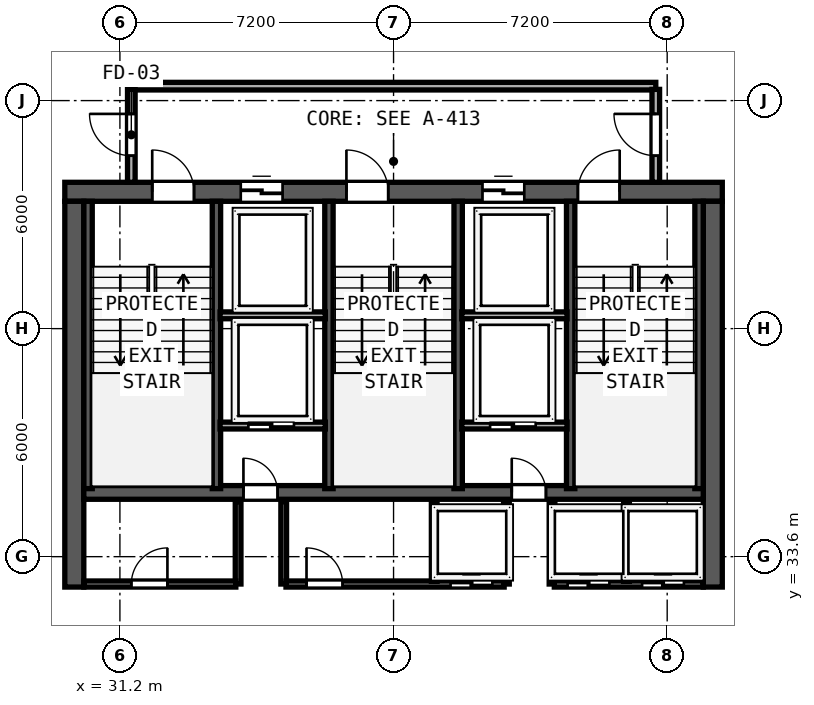
"""IFC4 building model, lengths in metres.
Left out: names, types, materials, properties, quantities, classifications, styles, units other than length and angle.
Written with IfcOpenShell. Run it as: python <this file> out.ifc"""

import sys

from ifc_helpers import new_model, si_unit, direction, frame, frame_2d, origin, place, context, subcontext, project, spatial, rectangle, extrude, element, fill, save


model = new_model("IFC4")
c1 = context("Model", 3, precision=1e-05, world=origin(), true_north=direction((0.0, 1.0)))
c2 = subcontext(c1, "Body", "Model", "MODEL_VIEW")
j1 = project(units=[si_unit("LENGTHUNIT", "METRE"), si_unit("PLANEANGLEUNIT", "RADIAN")], contexts=[c1])
p1 = place(None, origin())
s1 = spatial("IfcSite", under=j1, at=p1, CompositionType="ELEMENT")
p2 = place(p1, origin())
s2 = spatial("IfcBuilding", under=s1, at=p2, CompositionType="ELEMENT")
p3 = place(p2, frame((0.0, 0.0, 246.75)))
s3 = spatial("IfcBuildingStorey", under=s2, at=p3, CompositionType="ELEMENT", Elevation=246.75)
p4 = place(p3, frame((29.75, 43.2, 0.0), z_axis=(0.0, 0.0, 1.0), x_axis=(1.0, 0.0, 0.0)))
e1 = element("IfcWall", 1, at=p4, inside=s3, PredefinedType="SHEAR", context=c2, shape_type="SweptSolid", body=[
    extrude(rectangle(XDim=17.3, YDim=0.5, at=frame_2d((8.65, 0.0))), origin(), (0.0, 0.0, 1.0), 3.67),
])
p5 = place(p4, frame((2.3, 0.0, 0.0)))
e2 = element("IfcOpeningElement", 2, at=p5, cuts=e1, PredefinedType="OPENING", context=c2, shape_type="SweptSolid", body=[
    extrude(rectangle(XDim=1.1, YDim=2.15, at=frame_2d((0.55, 1.075))), frame((0.0, 0.26, 0.0), z_axis=(0.0, -1.0, 0.0), x_axis=(1.0, 0.0, 0.0)), (0.0, 0.0, 1.0), 0.52),
])
p6 = place(p4, frame((7.41, 0.0, 0.0)))
e3 = element("IfcOpeningElement", 3, at=p6, cuts=e1, PredefinedType="OPENING", context=c2, shape_type="SweptSolid", body=[
    extrude(rectangle(XDim=1.1, YDim=2.15, at=frame_2d((0.55, 1.075))), frame((0.0, 0.26, 0.0), z_axis=(0.0, -1.0, 0.0), x_axis=(1.0, 0.0, 0.0)), (0.0, 0.0, 1.0), 0.52),
])
p7 = place(p4, frame((13.5, 0.0, 0.0)))
e4 = element("IfcOpeningElement", 4, at=p7, cuts=e1, PredefinedType="OPENING", context=c2, shape_type="SweptSolid", body=[
    extrude(rectangle(XDim=1.1, YDim=2.15, at=frame_2d((0.55, 1.075))), frame((0.0, 0.26, 0.0), z_axis=(0.0, -1.0, 0.0), x_axis=(1.0, 0.0, 0.0)), (0.0, 0.0, 1.0), 0.52),
])
p8 = place(p4, frame((4.63, 0.0, 0.0)))
e5 = element("IfcOpeningElement", 5, at=p8, cuts=e1, PredefinedType="OPENING", context=c2, shape_type="SweptSolid", body=[
    extrude(rectangle(XDim=1.1, YDim=2.2, at=frame_2d((0.55, 1.1))), frame((0.0, 0.26, 0.0), z_axis=(0.0, -1.0, 0.0), x_axis=(1.0, 0.0, 0.0)), (0.0, 0.0, 1.0), 0.52),
])
p9 = place(p4, frame((10.99, 0.0, 0.0)))
e6 = element("IfcOpeningElement", 6, at=p9, cuts=e1, PredefinedType="OPENING", context=c2, shape_type="SweptSolid", body=[
    extrude(rectangle(XDim=1.1, YDim=2.2, at=frame_2d((0.55, 1.1))), frame((0.0, 0.26, 0.0), z_axis=(0.0, -1.0, 0.0), x_axis=(1.0, 0.0, 0.0)), (0.0, 0.0, 1.0), 0.52),
])
for number, where, z_axis, x_axis in (
    (7, (30.0, 32.8, 0.0), (0.0, 0.0, 1.0), (0.0, 1.0, 0.0)),
    (8, (46.8, 32.8, 0.0), (0.0, 0.0, 1.0), (0.0, 1.0, 0.0)),
):
    element("IfcWall", number, at=place(p3, frame(where, z_axis=z_axis, x_axis=x_axis)), inside=s3, PredefinedType="SHEAR", context=c2, shape_type="SweptSolid", body=[
        extrude(rectangle(XDim=10.15, YDim=0.5, at=frame_2d((5.075, 0.0))), origin(), (0.0, 0.0, 1.0), 3.67),
    ])
p10 = place(p3, frame((30.25, 35.29, 0.0), z_axis=(0.0, 0.0, 1.0), x_axis=(1.0, 0.0, 0.0)))
e9 = element("IfcWall", 9, at=p10, inside=s3, PredefinedType="SHEAR", context=c2, shape_type="SweptSolid", body=[
    extrude(rectangle(XDim=16.3, YDim=0.36, at=frame_2d((8.15, 0.0))), origin(), (0.0, 0.0, 1.0), 3.67),
])
p11 = place(p10, frame((5.1, 0.0, 0.0), z_axis=(0.0, 0.0, 1.0), x_axis=(-1.0, 0.0, 0.0)))
e10 = element("IfcOpeningElement", 10, at=p11, cuts=e9, PredefinedType="OPENING", context=c2, shape_type="SweptSolid", body=[
    extrude(rectangle(XDim=0.9, YDim=2.1, at=frame_2d((0.45, 1.05))), frame((0.0, 0.19, 0.0), z_axis=(0.0, -1.0, 0.0), x_axis=(1.0, 0.0, 0.0)), (0.0, 0.0, 1.0), 0.38),
])
p12 = place(p10, frame((12.16, 0.0, 0.0), z_axis=(0.0, 0.0, 1.0), x_axis=(-1.0, 0.0, 0.0)))
e11 = element("IfcOpeningElement", 11, at=p12, cuts=e9, PredefinedType="OPENING", context=c2, shape_type="SweptSolid", body=[
    extrude(rectangle(XDim=0.9, YDim=2.1, at=frame_2d((0.45, 1.05))), frame((0.0, 0.19, 0.0), z_axis=(0.0, -1.0, 0.0), x_axis=(1.0, 0.0, 0.0)), (0.0, 0.0, 1.0), 0.38),
])
for number, where, z_axis, x_axis in (
    (12, (30.362, 35.39, 0.0), (0.0, 0.0, 1.0), (0.0, 1.0, 0.0)),
    (13, (33.74, 35.39, 0.0), (0.0, 0.0, 1.0), (0.0, 1.0, 0.0)),
    (14, (36.7, 35.39, 0.0), (0.0, 0.0, 1.0), (0.0, 1.0, 0.0)),
    (15, (40.1, 35.39, 0.0), (0.0, 0.0, 1.0), (0.0, 1.0, 0.0)),
    (16, (43.06, 35.39, 0.0), (0.0, 0.0, 1.0), (0.0, 1.0, 0.0)),
    (17, (46.438, 35.39, 0.0), (0.0, 0.0, 1.0), (0.0, 1.0, 0.0)),
):
    element("IfcWall", number, at=place(p3, frame(where, z_axis=z_axis, x_axis=x_axis)), inside=s3, PredefinedType="SHEAR", context=c2, shape_type="SweptSolid", body=[
        extrude(rectangle(XDim=7.56, YDim=0.22, at=frame_2d((3.78, 0.0))), origin(), (0.0, 0.0, 1.0), 3.67),
    ])
p13 = place(p3, frame((31.5, 45.98, 0.0), z_axis=(0.0, 0.0, 1.0), x_axis=(1.0, 0.0, 0.0)))
e18 = element("IfcWall", 18, at=p13, inside=s3, PredefinedType="SOLIDWALL", context=c2, shape_type="SweptSolid", body=[
    extrude(rectangle(XDim=13.8, YDim=0.2, at=frame_2d((6.9, 0.0))), origin(), (0.0, 0.0, 1.0), 3.67),
])
p14 = place(p3, frame((31.5, 43.45, 0.0), z_axis=(0.0, 0.0, 1.0), x_axis=(0.0, 1.0, 0.0)))
e19 = element("IfcWall", 19, at=p14, inside=s3, PredefinedType="SOLIDWALL", context=c2, shape_type="SweptSolid", body=[
    extrude(rectangle(XDim=2.445, YDim=0.2, at=frame_2d((1.223, 0.0))), origin(), (0.0, 0.0, 1.0), 3.67),
])
p15 = place(p14, frame((1.8, 0.0, 0.0), z_axis=(0.0, 0.0, 1.0), x_axis=(-1.0, 0.0, 0.0)))
e20 = element("IfcOpeningElement", 20, at=p15, cuts=e19, PredefinedType="OPENING", context=c2, shape_type="SweptSolid", body=[
    extrude(rectangle(XDim=1.1, YDim=2.15, at=frame_2d((0.55, 1.075))), frame((0.0, 0.11, 0.0), z_axis=(0.0, -1.0, 0.0), x_axis=(1.0, 0.0, 0.0)), (0.0, 0.0, 1.0), 0.22),
])
p16 = place(p3, frame((45.3, 43.45, 0.0), z_axis=(0.0, 0.0, 1.0), x_axis=(0.0, 1.0, 0.0)))
e21 = element("IfcWall", 21, at=p16, inside=s3, PredefinedType="SOLIDWALL", context=c2, shape_type="SweptSolid", body=[
    extrude(rectangle(XDim=2.445, YDim=0.2, at=frame_2d((1.223, 0.0))), origin(), (0.0, 0.0, 1.0), 3.67),
])
p17 = place(p16, frame((0.7, 0.0, 0.0)))
e22 = element("IfcOpeningElement", 22, at=p17, cuts=e21, PredefinedType="OPENING", context=c2, shape_type="SweptSolid", body=[
    extrude(rectangle(XDim=1.1, YDim=2.15, at=frame_2d((0.55, 1.075))), frame((0.0, 0.11, 0.0), z_axis=(0.0, -1.0, 0.0), x_axis=(1.0, 0.0, 0.0)), (0.0, 0.0, 1.0), 0.22),
])
for number, where, z_axis, x_axis in (
    (23, (33.835, 39.95, 0.0), (0.0, 0.0, 1.0), (1.0, 0.0, 0.0)),
    (24, (40.195, 39.95, 0.0), (0.0, 0.0, 1.0), (1.0, 0.0, 0.0)),
):
    element("IfcWall", number, at=place(p3, frame(where, z_axis=z_axis, x_axis=x_axis)), inside=s3, PredefinedType="SOLIDWALL", context=c2, shape_type="SweptSolid", body=[
        extrude(rectangle(XDim=2.77, YDim=0.18, at=frame_2d((1.385, 0.0))), origin(), (0.0, 0.0, 1.0), 3.67),
    ])
p18 = place(p3, frame((33.835, 37.05, 0.0), z_axis=(0.0, 0.0, 1.0), x_axis=(1.0, 0.0, 0.0)))
e25 = element("IfcWall", 25, at=p18, inside=s3, PredefinedType="SOLIDWALL", context=c2, shape_type="SweptSolid", body=[
    extrude(rectangle(XDim=2.77, YDim=0.18, at=frame_2d((1.385, 0.0))), origin(), (0.0, 0.0, 1.0), 3.67),
])
p19 = place(p18, frame((1.945, 0.0, 0.0), z_axis=(0.0, 0.0, 1.0), x_axis=(-1.0, 0.0, 0.0)))
e26 = element("IfcOpeningElement", 26, at=p19, cuts=e25, PredefinedType="OPENING", context=c2, shape_type="SweptSolid", body=[
    extrude(rectangle(XDim=1.2, YDim=2.2, at=frame_2d((0.6, 1.1))), frame((0.0, 0.1, 0.0), z_axis=(0.0, -1.0, 0.0), x_axis=(1.0, 0.0, 0.0)), (0.0, 0.0, 1.0), 0.2),
])
for number, where, z_axis, x_axis in (
    (27, (34.31, 32.88, 0.0), (0.0, 0.0, 1.0), (0.0, 1.0, 0.0)),
    (28, (35.51, 32.88, 0.0), (0.0, 0.0, 1.0), (0.0, 1.0, 0.0)),
):
    element("IfcWall", number, at=place(p3, frame(where, z_axis=z_axis, x_axis=x_axis)), inside=s3, PredefinedType="SOLIDWALL", context=c2, shape_type="SweptSolid", body=[
        extrude(rectangle(XDim=2.17, YDim=0.15, at=frame_2d((1.085, 0.0))), origin(), (0.0, 0.0, 1.0), 3.67),
    ])
p20 = place(p3, frame((40.195, 37.05, 0.0), z_axis=(0.0, 0.0, 1.0), x_axis=(1.0, 0.0, 0.0)))
e29 = element("IfcWall", 29, at=p20, inside=s3, PredefinedType="SOLIDWALL", context=c2, shape_type="SweptSolid", body=[
    extrude(rectangle(XDim=2.77, YDim=0.18, at=frame_2d((1.385, 0.0))), origin(), (0.0, 0.0, 1.0), 3.67),
])
p21 = place(p20, frame((1.945, 0.0, 0.0), z_axis=(0.0, 0.0, 1.0), x_axis=(-1.0, 0.0, 0.0)))
e30 = element("IfcOpeningElement", 30, at=p21, cuts=e29, PredefinedType="OPENING", context=c2, shape_type="SweptSolid", body=[
    extrude(rectangle(XDim=1.2, YDim=2.2, at=frame_2d((0.6, 1.1))), frame((0.0, 0.1, 0.0), z_axis=(0.0, -1.0, 0.0), x_axis=(1.0, 0.0, 0.0)), (0.0, 0.0, 1.0), 0.2),
])
for number, where, z_axis, x_axis in (
    (31, (41.37, 32.88, 0.0), (0.0, 0.0, 1.0), (0.0, 1.0, 0.0)),
    (32, (42.57, 32.88, 0.0), (0.0, 0.0, 1.0), (0.0, 1.0, 0.0)),
):
    element("IfcWall", number, at=place(p3, frame(where, z_axis=z_axis, x_axis=x_axis)), inside=s3, PredefinedType="SOLIDWALL", context=c2, shape_type="SweptSolid", body=[
        extrude(rectangle(XDim=2.17, YDim=0.15, at=frame_2d((1.085, 0.0))), origin(), (0.0, 0.0, 1.0), 3.67),
    ])
p22 = place(p3, frame((30.25, 32.88, 0.0), z_axis=(0.0, 0.0, 1.0), x_axis=(1.0, 0.0, 0.0)))
e33 = element("IfcWall", 33, at=p22, inside=s3, PredefinedType="SOLIDWALL", context=c2, shape_type="SweptSolid", body=[
    extrude(rectangle(XDim=4.0, YDim=0.16, at=frame_2d((2.0, 0.0))), origin(), (0.0, 0.0, 1.0), 3.67),
])
p23 = place(p22, frame((2.2, 0.0, 0.0), z_axis=(0.0, 0.0, 1.0), x_axis=(-1.0, 0.0, 0.0)))
e34 = element("IfcOpeningElement", 34, at=p23, cuts=e33, PredefinedType="OPENING", context=c2, shape_type="SweptSolid", body=[
    extrude(rectangle(XDim=0.95, YDim=2.12, at=frame_2d((0.475, 1.06))), frame((0.0, 0.09, 0.0), z_axis=(0.0, -1.0, 0.0), x_axis=(1.0, 0.0, 0.0)), (0.0, 0.0, 1.0), 0.18),
])
p24 = place(p3, frame((35.57, 32.88, 0.0), z_axis=(0.0, 0.0, 1.0), x_axis=(1.0, 0.0, 0.0)))
e35 = element("IfcWall", 35, at=p24, inside=s3, PredefinedType="SOLIDWALL", context=c2, shape_type="SweptSolid", body=[
    extrude(rectangle(XDim=5.74, YDim=0.16, at=frame_2d((2.87, 0.0))), origin(), (0.0, 0.0, 1.0), 3.67),
])
p25 = place(p24, frame((1.49, 0.0, 0.0), z_axis=(0.0, 0.0, 1.0), x_axis=(-1.0, 0.0, 0.0)))
e36 = element("IfcOpeningElement", 36, at=p25, cuts=e35, PredefinedType="OPENING", context=c2, shape_type="SweptSolid", body=[
    extrude(rectangle(XDim=0.95, YDim=2.12, at=frame_2d((0.475, 1.06))), frame((0.0, 0.09, 0.0), z_axis=(0.0, -1.0, 0.0), x_axis=(1.0, 0.0, 0.0)), (0.0, 0.0, 1.0), 0.18),
])
p26 = place(p24, frame((5.43, 0.0, 0.0), z_axis=(0.0, 0.0, 1.0), x_axis=(-1.0, 0.0, 0.0)))
e37 = element("IfcOpeningElement", 37, at=p26, cuts=e35, PredefinedType="OPENING", context=c2, shape_type="SweptSolid", body=[
    extrude(rectangle(XDim=1.1, YDim=2.2, at=frame_2d((0.55, 1.1))), frame((0.0, 0.09, 0.0), z_axis=(0.0, -1.0, 0.0), x_axis=(1.0, 0.0, 0.0)), (0.0, 0.0, 1.0), 0.18),
])
p27 = place(p3, frame((42.63, 32.88, 0.0), z_axis=(0.0, 0.0, 1.0), x_axis=(1.0, 0.0, 0.0)))
e38 = element("IfcWall", 38, at=p27, inside=s3, PredefinedType="SOLIDWALL", context=c2, shape_type="SweptSolid", body=[
    extrude(rectangle(XDim=3.92, YDim=0.16, at=frame_2d((1.96, 0.0))), origin(), (0.0, 0.0, 1.0), 3.67),
])
p28 = place(p27, frame((1.45, 0.0, 0.0), z_axis=(0.0, 0.0, 1.0), x_axis=(-1.0, 0.0, 0.0)))
e39 = element("IfcOpeningElement", 39, at=p28, cuts=e38, PredefinedType="OPENING", context=c2, shape_type="SweptSolid", body=[
    extrude(rectangle(XDim=1.1, YDim=2.2, at=frame_2d((0.55, 1.1))), frame((0.0, 0.09, 0.0), z_axis=(0.0, -1.0, 0.0), x_axis=(1.0, 0.0, 0.0)), (0.0, 0.0, 1.0), 0.18),
])
p29 = place(p27, frame((3.41, 0.0, 0.0), z_axis=(0.0, 0.0, 1.0), x_axis=(-1.0, 0.0, 0.0)))
e40 = element("IfcOpeningElement", 40, at=p29, cuts=e38, PredefinedType="OPENING", context=c2, shape_type="SweptSolid", body=[
    extrude(rectangle(XDim=1.1, YDim=2.2, at=frame_2d((0.55, 1.1))), frame((0.0, 0.09, 0.0), z_axis=(0.0, -1.0, 0.0), x_axis=(1.0, 0.0, 0.0)), (0.0, 0.0, 1.0), 0.18),
])
for number, where, z_axis, x_axis in (
    (41, (39.47, 32.95, 0.0), (0.0, 0.0, 1.0), (0.0, 1.0, 0.0)),
    (42, (44.53, 32.95, 0.0), (0.0, 0.0, 1.0), (0.0, 1.0, 0.0)),
):
    element("IfcWall", number, at=place(p3, frame(where, z_axis=z_axis, x_axis=x_axis)), inside=s3, PredefinedType="SOLIDWALL", context=c2, shape_type="SweptSolid", body=[
        extrude(rectangle(XDim=2.05, YDim=0.15, at=frame_2d((1.025, 0.0))), origin(), (0.0, 0.0, 1.0), 3.67),
    ])
p30 = place(p5, origin())
e43 = element("IfcDoor", 43, at=p30, inside=s3, OperationType="SINGLE_SWING_LEFT", PredefinedType="DOOR", context=c2, shape_type="SweptSolid", body=[
    extrude(rectangle(XDim=1.1, YDim=2.15, at=frame_2d((0.55, 1.075))), frame((0.0, 0.185, 0.0), z_axis=(0.0, -1.0, 0.0), x_axis=(1.0, 0.0, 0.0)), (0.0, 0.0, 1.0), 0.05),
])
fill(e2, e43)
p31 = place(p6, origin())
e44 = element("IfcDoor", 44, at=p31, inside=s3, OperationType="SINGLE_SWING_LEFT", PredefinedType="DOOR", context=c2, shape_type="SweptSolid", body=[
    extrude(rectangle(XDim=1.1, YDim=2.15, at=frame_2d((0.55, 1.075))), frame((0.0, 0.185, 0.0), z_axis=(0.0, -1.0, 0.0), x_axis=(1.0, 0.0, 0.0)), (0.0, 0.0, 1.0), 0.05),
])
fill(e3, e44)
p32 = place(p7, origin())
e45 = element("IfcDoor", 45, at=p32, inside=s3, OperationType="SINGLE_SWING_RIGHT", PredefinedType="DOOR", context=c2, shape_type="SweptSolid", body=[
    extrude(rectangle(XDim=1.1, YDim=2.15, at=frame_2d((0.55, 1.075))), frame((0.0, 0.185, 0.0), z_axis=(0.0, -1.0, 0.0), x_axis=(1.0, 0.0, 0.0)), (0.0, 0.0, 1.0), 0.05),
])
fill(e4, e45)
p33 = place(p15, origin())
e46 = element("IfcDoor", 46, at=p33, inside=s3, OperationType="SINGLE_SWING_LEFT", PredefinedType="DOOR", context=c2, shape_type="SweptSolid", body=[
    extrude(rectangle(XDim=1.1, YDim=2.15, at=frame_2d((0.55, 1.075))), frame((0.0, 0.025, 0.0), z_axis=(0.0, -1.0, 0.0), x_axis=(1.0, 0.0, 0.0)), (0.0, 0.0, 1.0), 0.05),
])
fill(e20, e46)
p34 = place(p17, origin())
e47 = element("IfcDoor", 47, at=p34, inside=s3, OperationType="SINGLE_SWING_RIGHT", PredefinedType="DOOR", context=c2, shape_type="SweptSolid", body=[
    extrude(rectangle(XDim=1.1, YDim=2.15, at=frame_2d((0.55, 1.075))), frame((0.0, 0.025, 0.0), z_axis=(0.0, -1.0, 0.0), x_axis=(1.0, 0.0, 0.0)), (0.0, 0.0, 1.0), 0.05),
])
fill(e22, e47)
p35 = place(p8, origin())
e48 = element("IfcDoor", 48, at=p35, inside=s3, OperationType="SLIDING_TO_LEFT", PredefinedType="DOOR", context=c2, shape_type="SweptSolid", body=[
    extrude(rectangle(XDim=1.1, YDim=2.2, at=frame_2d((0.55, 1.1))), frame((0.0, 0.185, 0.0), z_axis=(0.0, -1.0, 0.0), x_axis=(1.0, 0.0, 0.0)), (0.0, 0.0, 1.0), 0.05),
])
fill(e5, e48)
p36 = place(p9, origin())
e49 = element("IfcDoor", 49, at=p36, inside=s3, OperationType="SLIDING_TO_LEFT", PredefinedType="DOOR", context=c2, shape_type="SweptSolid", body=[
    extrude(rectangle(XDim=1.1, YDim=2.2, at=frame_2d((0.55, 1.1))), frame((0.0, 0.185, 0.0), z_axis=(0.0, -1.0, 0.0), x_axis=(1.0, 0.0, 0.0)), (0.0, 0.0, 1.0), 0.05),
])
fill(e6, e49)
p37 = place(p19, origin())
e50 = element("IfcDoor", 50, at=p37, inside=s3, OperationType="SLIDING_TO_RIGHT", PredefinedType="DOOR", context=c2, shape_type="SweptSolid", body=[
    extrude(rectangle(XDim=1.2, YDim=2.2, at=frame_2d((0.6, 1.1))), frame((0.0, 0.025, 0.0), z_axis=(0.0, -1.0, 0.0), x_axis=(1.0, 0.0, 0.0)), (0.0, 0.0, 1.0), 0.05),
])
fill(e26, e50)
p38 = place(p11, origin())
e51 = element("IfcDoor", 51, at=p38, inside=s3, OperationType="SINGLE_SWING_RIGHT", PredefinedType="DOOR", context=c2, shape_type="SweptSolid", body=[
    extrude(rectangle(XDim=0.9, YDim=2.1, at=frame_2d((0.45, 1.05))), frame((0.0, 0.025, 0.0), z_axis=(0.0, -1.0, 0.0), x_axis=(1.0, 0.0, 0.0)), (0.0, 0.0, 1.0), 0.05),
])
fill(e10, e51)
p39 = place(p21, origin())
e52 = element("IfcDoor", 52, at=p39, inside=s3, OperationType="SLIDING_TO_RIGHT", PredefinedType="DOOR", context=c2, shape_type="SweptSolid", body=[
    extrude(rectangle(XDim=1.2, YDim=2.2, at=frame_2d((0.6, 1.1))), frame((0.0, 0.025, 0.0), z_axis=(0.0, -1.0, 0.0), x_axis=(1.0, 0.0, 0.0)), (0.0, 0.0, 1.0), 0.05),
])
fill(e30, e52)
p40 = place(p12, origin())
e53 = element("IfcDoor", 53, at=p40, inside=s3, OperationType="SINGLE_SWING_RIGHT", PredefinedType="DOOR", context=c2, shape_type="SweptSolid", body=[
    extrude(rectangle(XDim=0.9, YDim=2.1, at=frame_2d((0.45, 1.05))), frame((0.0, 0.025, 0.0), z_axis=(0.0, -1.0, 0.0), x_axis=(1.0, 0.0, 0.0)), (0.0, 0.0, 1.0), 0.05),
])
fill(e11, e53)
p41 = place(p23, origin())
e54 = element("IfcDoor", 54, at=p41, inside=s3, OperationType="SINGLE_SWING_LEFT", PredefinedType="DOOR", context=c2, shape_type="SweptSolid", body=[
    extrude(rectangle(XDim=0.95, YDim=2.12, at=frame_2d((0.475, 1.06))), frame((0.0, 0.025, 0.0), z_axis=(0.0, -1.0, 0.0), x_axis=(1.0, 0.0, 0.0)), (0.0, 0.0, 1.0), 0.05),
])
fill(e34, e54)
p42 = place(p25, origin())
e55 = element("IfcDoor", 55, at=p42, inside=s3, OperationType="SINGLE_SWING_RIGHT", PredefinedType="DOOR", context=c2, shape_type="SweptSolid", body=[
    extrude(rectangle(XDim=0.95, YDim=2.12, at=frame_2d((0.475, 1.06))), frame((0.0, 0.025, 0.0), z_axis=(0.0, -1.0, 0.0), x_axis=(1.0, 0.0, 0.0)), (0.0, 0.0, 1.0), 0.05),
])
fill(e36, e55)
p43 = place(p26, origin())
e56 = element("IfcDoor", 56, at=p43, inside=s3, OperationType="SLIDING_TO_RIGHT", PredefinedType="DOOR", context=c2, shape_type="SweptSolid", body=[
    extrude(rectangle(XDim=1.1, YDim=2.2, at=frame_2d((0.55, 1.1))), frame((0.0, 0.025, 0.0), z_axis=(0.0, -1.0, 0.0), x_axis=(1.0, 0.0, 0.0)), (0.0, 0.0, 1.0), 0.05),
])
fill(e37, e56)
p44 = place(p28, origin())
e57 = element("IfcDoor", 57, at=p44, inside=s3, OperationType="SLIDING_TO_RIGHT", PredefinedType="DOOR", context=c2, shape_type="SweptSolid", body=[
    extrude(rectangle(XDim=1.1, YDim=2.2, at=frame_2d((0.55, 1.1))), frame((0.0, 0.025, 0.0), z_axis=(0.0, -1.0, 0.0), x_axis=(1.0, 0.0, 0.0)), (0.0, 0.0, 1.0), 0.05),
])
fill(e39, e57)
p45 = place(p29, origin())
e58 = element("IfcDoor", 58, at=p45, inside=s3, OperationType="SLIDING_TO_RIGHT", PredefinedType="DOOR", context=c2, shape_type="SweptSolid", body=[
    extrude(rectangle(XDim=1.1, YDim=2.2, at=frame_2d((0.55, 1.1))), frame((0.0, 0.025, 0.0), z_axis=(0.0, -1.0, 0.0), x_axis=(1.0, 0.0, 0.0)), (0.0, 0.0, 1.0), 0.05),
])
fill(e40, e58)
save(model, sys.argv[1])
